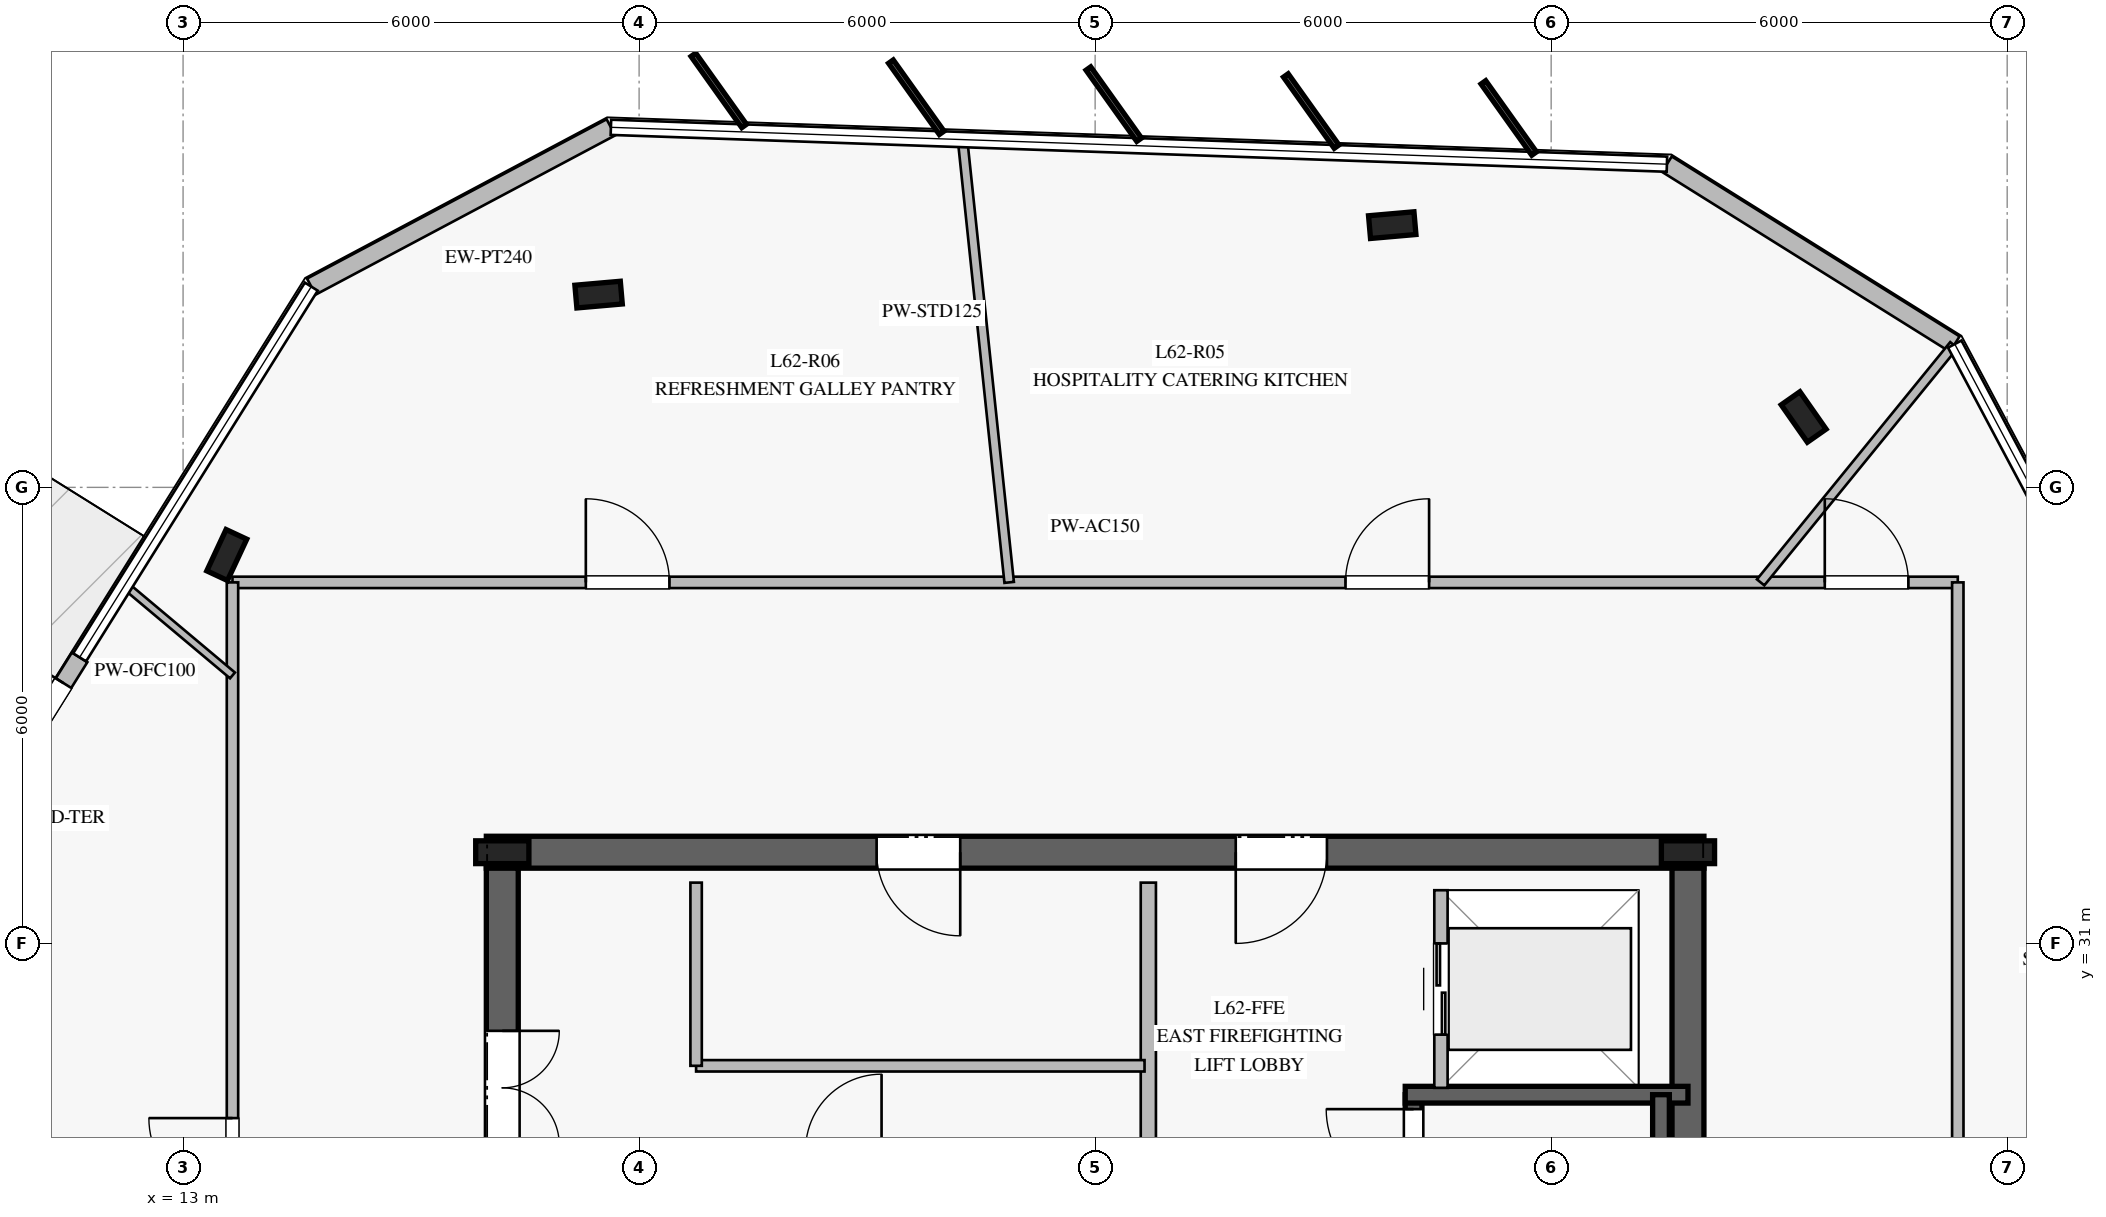
"""IFC4 building model, lengths in metres.
Left out: names, types, materials, properties, quantities, classifications, styles, units other than length and angle.
Written with IfcOpenShell. Run it as: python <this file> out.ifc"""

import sys

from ifc_helpers import new_model, si_unit, direction, frame, frame_2d, origin, origin_2d, place, context, subcontext, project, spatial, rectangle, i_section, extrude, element, fill, save


model = new_model("IFC4")
c1 = context("Model", 3, precision=1e-05, world=origin(), true_north=direction((0.0, 1.0)))
c2 = subcontext(c1, "Body", "Model", "MODEL_VIEW")
j1 = project(units=[si_unit("LENGTHUNIT", "METRE"), si_unit("PLANEANGLEUNIT", "RADIAN")], contexts=[c1])
p1 = place(None, origin())
s1 = spatial("IfcSite", under=j1, at=p1, CompositionType="ELEMENT")
p2 = place(p1, origin())
s2 = spatial("IfcBuilding", under=s1, at=p2, CompositionType="ELEMENT")
p3 = place(p2, frame((0.0, 0.0, 258.2)))
s3 = spatial("IfcBuildingStorey", under=s2, at=p3, CompositionType="ELEMENT", Elevation=258.2)
p4 = place(p3, frame((33.01, 32.2, 0.0), z_axis=(0.0, 0.0, 1.0), x_axis=(-1.0, 0.0, 0.0)))
e1 = element("IfcWall", 1, at=p4, inside=s3, PredefinedType="SHEAR", context=c2, shape_type="SweptSolid", body=[
    extrude(rectangle(XDim=16.02, YDim=0.42, at=frame_2d((8.01, 0.0))), origin(), (0.0, 0.0, 1.0), 3.78),
])
p5 = place(p4, frame((4.96, 0.0, 0.0)))
e2 = element("IfcOpeningElement", 2, at=p5, cuts=e1, PredefinedType="OPENING", context=c2, shape_type="SweptSolid", body=[
    extrude(rectangle(XDim=1.2, YDim=2.25, at=frame_2d((0.6, 1.125))), frame((0.0, 0.22, 0.0), z_axis=(0.0, -1.0, 0.0), x_axis=(1.0, 0.0, 0.0)), (0.0, 0.0, 1.0), 0.44),
])
p6 = place(p4, frame((9.785, 0.0, 0.0)))
e3 = element("IfcOpeningElement", 3, at=p6, cuts=e1, PredefinedType="OPENING", context=c2, shape_type="SweptSolid", body=[
    extrude(rectangle(XDim=1.1, YDim=2.2, at=frame_2d((0.55, 1.1))), frame((0.0, 0.22, 0.0), z_axis=(0.0, -1.0, 0.0), x_axis=(1.0, 0.0, 0.0)), (0.0, 0.0, 1.0), 0.44),
])
p7 = place(p3, frame((17.2, 31.99, 0.0), z_axis=(0.0, 0.0, 1.0), x_axis=(0.0, -1.0, 0.0)))
e4 = element("IfcWall", 4, at=p7, inside=s3, PredefinedType="SHEAR", context=c2, shape_type="SweptSolid", body=[
    extrude(rectangle(XDim=13.98, YDim=0.42, at=frame_2d((6.99, 0.0))), origin(), (0.0, 0.0, 1.0), 3.78),
])
p8 = place(p7, frame((2.14, 0.0, 0.0)))
e5 = element("IfcOpeningElement", 5, at=p8, cuts=e4, PredefinedType="OPENING", context=c2, shape_type="SweptSolid", body=[
    extrude(rectangle(XDim=1.5, YDim=2.2, at=frame_2d((0.75, 1.1))), frame((0.0, 0.22, 0.0), z_axis=(0.0, -1.0, 0.0), x_axis=(1.0, 0.0, 0.0)), (0.0, 0.0, 1.0), 0.44),
])
p9 = place(p3, frame((32.8, 18.01, 0.0), z_axis=(0.0, 0.0, 1.0), x_axis=(0.0, 1.0, 0.0)))
e6 = element("IfcWall", 6, at=p9, inside=s3, PredefinedType="SHEAR", context=c2, shape_type="SweptSolid", body=[
    extrude(rectangle(XDim=13.98, YDim=0.42, at=frame_2d((6.99, 0.0))), origin(), (0.0, 0.0, 1.0), 3.78),
])
for number, where, z_axis, x_axis in (
    (7, (32.8, 32.2, 0.0), (0.0, 0.0, 1.0), (1.0, 0.0, 0.0)),
    (8, (17.2, 32.2, 0.0), (0.0, 0.0, 1.0), (1.0, 0.0, 0.0)),
):
    element("IfcColumn", number, at=place(p3, frame(where, z_axis=z_axis, x_axis=x_axis)), inside=s3, PredefinedType="COLUMN", context=c2, shape_type="SweptSolid", body=[
        extrude(i_section(OverallWidth=0.3, OverallDepth=0.7, WebThickness=0.017, FlangeThickness=0.032, at=origin_2d()), origin(), (0.0, 0.0, 1.0), 4.0),
    ])
p10 = place(p3, frame((29.19, 21.79, 0.0), z_axis=(0.0, 0.0, 1.0), x_axis=(0.0, 1.0, 0.0)))
e9 = element("IfcWall", 9, at=p10, inside=s3, PredefinedType="SOLIDWALL", context=c2, shape_type="SweptSolid", body=[
    extrude(rectangle(XDim=7.22, YDim=0.22, at=frame_2d((3.61, 0.0))), origin(), (0.0, 0.0, 1.0), 3.78),
])
p11 = place(p10, frame((5.88, 0.0, 0.0)))
e10 = element("IfcOpeningElement", 10, at=p11, cuts=e9, PredefinedType="OPENING", context=c2, shape_type="SweptSolid", body=[
    extrude(rectangle(XDim=1.15, YDim=2.2, at=frame_2d((0.575, 1.1))), frame((0.0, 0.12, 0.0), z_axis=(0.0, -1.0, 0.0), x_axis=(1.0, 0.0, 0.0)), (0.0, 0.0, 1.0), 0.24),
])
p12 = place(p3, frame((29.08, 29.01, 0.0), z_axis=(0.0, 0.0, 1.0), x_axis=(1.0, 0.0, 0.0)))
e11 = element("IfcWall", 11, at=p12, inside=s3, PredefinedType="SOLIDWALL", context=c2, shape_type="SweptSolid", body=[
    extrude(rectangle(XDim=3.72, YDim=0.22, at=frame_2d((1.86, 0.0))), origin(), (0.0, 0.0, 1.0), 3.78),
])
p13 = place(p3, frame((32.445, 29.01, 0.0), z_axis=(0.0, 0.0, 1.0), x_axis=(0.0, -1.0, 0.0)))
e12 = element("IfcWall", 12, at=p13, inside=s3, PredefinedType="SOLIDWALL", context=c2, shape_type="SweptSolid", body=[
    extrude(rectangle(XDim=7.22, YDim=0.22, at=frame_2d((3.61, 0.0))), origin(), (0.0, 0.0, 1.0), 3.78),
])
for number, where, z_axis, x_axis in (
    (13, (28.909, 40.45, 0.0), (0.0, 0.0, 1.0), (0.996, 0.087, 0.0)),
    (14, (18.467, 39.536, 0.0), (0.0, 0.0, 1.0), (0.996, 0.087, 0.0)),
    (15, (13.575, 36.11, 0.0), (0.0, 0.0, 1.0), (0.423, 0.906, 0.0)),
    (16, (34.322, 37.926, 0.0), (0.0, 0.0, 1.0), (-0.574, 0.819, 0.0)),
):
    element("IfcColumn", number, at=place(p3, frame(where, z_axis=z_axis, x_axis=x_axis)), inside=s3, PredefinedType="COLUMN", context=c2, shape_type="SweptSolid", body=[
        extrude(i_section(OverallWidth=0.3, OverallDepth=0.6, WebThickness=0.015, FlangeThickness=0.03, at=origin_2d()), origin(), (0.0, 0.0, 1.0), 4.0),
    ])
p14 = place(p3, frame((18.629, 41.737, 0.0), z_axis=(0.0, 0.0, 1.0), x_axis=(-0.88294715046, -0.469472394816, 0.0)))
e17 = element("IfcWall", 17, at=p14, inside=s3, PredefinedType="STANDARD", context=c2, shape_type="SweptSolid", body=[
    extrude(rectangle(XDim=4.464, YDim=0.24, at=frame_2d((2.232, 0.0))), origin(), (0.0, 0.0, 1.0), 3.78),
])
p15 = place(p3, frame((11.639, 34.764, 0.0), z_axis=(0.0, 0.0, 1.0), x_axis=(-0.529751954381, -0.84815262001, 0.0)))
e18 = element("IfcWall", 18, at=p15, inside=s3, PredefinedType="STANDARD", context=c2, shape_type="SweptSolid", body=[
    extrude(rectangle(XDim=2.399, YDim=0.24, at=frame_2d((1.2, 0.0))), origin(), (0.0, 0.0, 1.0), 3.78),
])
p16 = place(p15, frame((0.4, 0.0, 0.0)))
e19 = element("IfcOpeningElement", 19, at=p16, cuts=e18, PredefinedType="OPENING", context=c2, shape_type="SweptSolid", body=[
    extrude(rectangle(XDim=1.6, YDim=2.25, at=frame_2d((0.8, 1.125))), frame((0.0, 0.13, 0.0), z_axis=(0.0, -1.0, 0.0), x_axis=(1.0, 0.0, 0.0)), (0.0, 0.0, 1.0), 0.26),
])
p17 = place(p3, frame((36.31, 38.885, 0.0), z_axis=(0.0, 0.0, 1.0), x_axis=(-0.847998304005, 0.529998940003, 0.0)))
e20 = element("IfcWall", 20, at=p17, inside=s3, PredefinedType="STANDARD", context=c2, shape_type="SweptSolid", body=[
    extrude(rectangle(XDim=4.466, YDim=0.24, at=frame_2d((2.233, 0.0))), origin(), (0.0, 0.0, 1.0), 3.78),
])
p18 = place(p3, frame((25.7, 26.65, 0.0), z_axis=(0.0, 0.0, 1.0), x_axis=(0.0, 1.0, 0.0)))
e21 = element("IfcWall", 21, at=p18, inside=s3, PredefinedType="PARTITIONING", context=c2, shape_type="SweptSolid", body=[
    extrude(rectangle(XDim=5.15, YDim=0.2, at=frame_2d((2.575, 0.0))), origin(), (0.0, 0.0, 1.0), 3.78),
])
p19 = place(p3, frame((19.75, 29.39, 0.0), z_axis=(0.0, 0.0, 1.0), x_axis=(1.0, 0.0, 0.0)))
e22 = element("IfcWall", 22, at=p19, inside=s3, PredefinedType="PARTITIONING", context=c2, shape_type="SweptSolid", body=[
    extrude(rectangle(XDim=5.9, YDim=0.15, at=frame_2d((2.95, 0.0))), origin(), (0.0, 0.0, 1.0), 3.78),
])
p20 = place(p3, frame((19.75, 29.39, 0.0), z_axis=(0.0, 0.0, 1.0), x_axis=(0.0, 1.0, 0.0)))
e23 = element("IfcWall", 23, at=p20, inside=s3, PredefinedType="PARTITIONING", context=c2, shape_type="SweptSolid", body=[
    extrude(rectangle(XDim=2.41, YDim=0.15, at=frame_2d((1.205, 0.0))), origin(), (0.0, 0.0, 1.0), 3.78),
])
p21 = place(p3, frame((29.55, 29.1, 0.0), z_axis=(0.0, 0.0, 1.0), x_axis=(0.0, 1.0, 0.0)))
e24 = element("IfcWall", 24, at=p21, inside=s3, PredefinedType="PARTITIONING", context=c2, shape_type="SweptSolid", body=[
    extrude(rectangle(XDim=2.6, YDim=0.175, at=frame_2d((1.3, 0.0))), origin(), (0.0, 0.0, 1.0), 3.78),
])
p22 = place(p21, frame((0.7, 0.0, 0.0)))
e25 = element("IfcOpeningElement", 25, at=p22, cuts=e24, PredefinedType="OPENING", context=c2, shape_type="SweptSolid", body=[
    extrude(rectangle(XDim=1.2, YDim=2.2, at=frame_2d((0.6, 1.1))), frame((0.0, 0.098, 0.0), z_axis=(0.0, -1.0, 0.0), x_axis=(1.0, 0.0, 0.0)), (0.0, 0.0, 1.0), 0.195),
])
p23 = place(p3, frame((13.65, 35.75, 0.0), z_axis=(0.0, 0.0, 1.0), x_axis=(1.0, 0.0, 0.0)))
e26 = element("IfcWall", 26, at=p23, inside=s3, PredefinedType="PARTITIONING", context=c2, shape_type="SweptSolid", body=[
    extrude(rectangle(XDim=22.7, YDim=0.15, at=frame_2d((11.35, 0.0))), origin(), (0.0, 0.0, 1.0), 3.28),
])
p24 = place(p23, frame((20.95, 0.0, 0.0)))
e27 = element("IfcOpeningElement", 27, at=p24, cuts=e26, PredefinedType="OPENING", context=c2, shape_type="SweptSolid", body=[
    extrude(rectangle(XDim=1.1, YDim=2.2, at=frame_2d((0.55, 1.1))), frame((0.0, 0.085, 0.0), z_axis=(0.0, -1.0, 0.0), x_axis=(1.0, 0.0, 0.0)), (0.0, 0.0, 1.0), 0.17),
])
p25 = place(p23, frame((14.644, 0.0, 0.0)))
e28 = element("IfcOpeningElement", 28, at=p25, cuts=e26, PredefinedType="OPENING", context=c2, shape_type="SweptSolid", body=[
    extrude(rectangle(XDim=1.1, YDim=2.2, at=frame_2d((0.55, 1.1))), frame((0.0, 0.085, 0.0), z_axis=(0.0, -1.0, 0.0), x_axis=(1.0, 0.0, 0.0)), (0.0, 0.0, 1.0), 0.17),
])
p26 = place(p23, frame((4.649, 0.0, 0.0)))
e29 = element("IfcOpeningElement", 29, at=p26, cuts=e26, PredefinedType="OPENING", context=c2, shape_type="SweptSolid", body=[
    extrude(rectangle(XDim=1.1, YDim=2.2, at=frame_2d((0.55, 1.1))), frame((0.0, 0.085, 0.0), z_axis=(0.0, -1.0, 0.0), x_axis=(1.0, 0.0, 0.0)), (0.0, 0.0, 1.0), 0.17),
])
p27 = place(p3, frame((36.35, 35.75, 0.0), z_axis=(0.0, 0.0, 1.0), x_axis=(0.0, -1.0, 0.0)))
e30 = element("IfcWall", 30, at=p27, inside=s3, PredefinedType="PARTITIONING", context=c2, shape_type="SweptSolid", body=[
    extrude(rectangle(XDim=21.5, YDim=0.15, at=frame_2d((10.75, 0.0))), origin(), (0.0, 0.0, 1.0), 3.25),
])
p28 = place(p27, frame((14.876, 0.0, 0.0)))
e31 = element("IfcOpeningElement", 31, at=p28, cuts=e30, PredefinedType="OPENING", context=c2, shape_type="SweptSolid", body=[
    extrude(rectangle(XDim=1.1, YDim=2.2, at=frame_2d((0.55, 1.1))), frame((0.0, 0.085, 0.0), z_axis=(0.0, -1.0, 0.0), x_axis=(1.0, 0.0, 0.0)), (0.0, 0.0, 1.0), 0.17),
])
p29 = place(p3, frame((13.65, 14.25, 0.0), z_axis=(0.0, 0.0, 1.0), x_axis=(0.0, 1.0, 0.0)))
e32 = element("IfcWall", 32, at=p29, inside=s3, PredefinedType="PARTITIONING", context=c2, shape_type="SweptSolid", body=[
    extrude(rectangle(XDim=21.5, YDim=0.15, at=frame_2d((10.75, 0.0))), origin(), (0.0, 0.0, 1.0), 3.25),
])
p30 = place(p29, frame((13.352, 0.0, 0.0)))
e33 = element("IfcOpeningElement", 33, at=p30, cuts=e32, PredefinedType="OPENING", context=c2, shape_type="SweptSolid", body=[
    extrude(rectangle(XDim=1.1, YDim=2.2, at=frame_2d((0.55, 1.1))), frame((0.0, 0.085, 0.0), z_axis=(0.0, -1.0, 0.0), x_axis=(1.0, 0.0, 0.0)), (0.0, 0.0, 1.0), 0.17),
])
p31 = place(p3, frame((23.869, 35.75, 0.0), z_axis=(0.0, 0.0, 1.0), x_axis=(-0.104723940422, 0.994501330468, 0.0)))
e34 = element("IfcWall", 34, at=p31, inside=s3, PredefinedType="PARTITIONING", context=c2, shape_type="SweptSolid", body=[
    extrude(rectangle(XDim=5.842, YDim=0.125, at=frame_2d((2.921, 0.0))), origin(), (0.0, 0.0, 1.0), 3.28),
])
p32 = place(p3, frame((13.65, 34.526, 0.0), z_axis=(0.0, 0.0, 1.0), x_axis=(-0.76596722559, 0.64287962273, 0.0)))
e35 = element("IfcWall", 35, at=p32, inside=s3, PredefinedType="MOVABLE", context=c2, shape_type="SweptSolid", body=[
    extrude(rectangle(XDim=1.833, YDim=0.1, at=frame_2d((0.917, 0.0))), origin(), (0.0, 0.0, 1.0), 3.28),
])
p33 = place(p3, frame((33.756, 35.75, 0.0), z_axis=(0.0, 0.0, 1.0), x_axis=(0.631532584773, 0.775349336989, 0.0)))
e36 = element("IfcWall", 36, at=p33, inside=s3, PredefinedType="PARTITIONING", context=c2, shape_type="SweptSolid", body=[
    extrude(rectangle(XDim=4.027, YDim=0.125, at=frame_2d((2.013, 0.0))), origin(), (0.0, 0.0, 1.0), 3.28),
])
p34 = place(p16, frame((1.6, 0.0, 0.0), z_axis=(0.0, 0.0, 1.0), x_axis=(-1.0, 0.0, 0.0)))
e37 = element("IfcDoor", 37, at=p34, inside=s3, OperationType="DOUBLE_DOOR_SINGLE_SWING", PredefinedType="DOOR", context=c2, shape_type="SweptSolid", body=[
    extrude(rectangle(XDim=1.6, YDim=2.25, at=frame_2d((0.8, 1.125))), frame((0.0, 0.025, 0.0), z_axis=(0.0, -1.0, 0.0), x_axis=(1.0, 0.0, 0.0)), (0.0, 0.0, 1.0), 0.05),
])
fill(e19, e37)
p35 = place(p11, origin())
e38 = element("IfcDoor", 38, at=p35, inside=s3, OperationType="SINGLE_SWING_RIGHT", PredefinedType="DOOR", context=c2, shape_type="SweptSolid", body=[
    extrude(rectangle(XDim=1.15, YDim=2.2, at=frame_2d((0.575, 1.1))), frame((0.0, 0.025, 0.0), z_axis=(0.0, -1.0, 0.0), x_axis=(1.0, 0.0, 0.0)), (0.0, 0.0, 1.0), 0.05),
])
fill(e10, e38)
p36 = place(p5, origin())
e39 = element("IfcDoor", 39, at=p36, inside=s3, OperationType="SINGLE_SWING_RIGHT", PredefinedType="DOOR", context=c2, shape_type="SweptSolid", body=[
    extrude(rectangle(XDim=1.2, YDim=2.25, at=frame_2d((0.6, 1.125))), frame((0.0, 0.025, 0.0), z_axis=(0.0, -1.0, 0.0), x_axis=(1.0, 0.0, 0.0)), (0.0, 0.0, 1.0), 0.05),
])
fill(e2, e39)
p37 = place(p8, origin())
e40 = element("IfcDoor", 40, at=p37, inside=s3, OperationType="DOUBLE_DOOR_SINGLE_SWING", PredefinedType="DOOR", context=c2, shape_type="SweptSolid", body=[
    extrude(rectangle(XDim=1.5, YDim=2.2, at=frame_2d((0.75, 1.1))), frame((0.0, 0.025, 0.0), z_axis=(0.0, -1.0, 0.0), x_axis=(1.0, 0.0, 0.0)), (0.0, 0.0, 1.0), 0.05),
])
fill(e5, e40)
p38 = place(p6, origin())
e41 = element("IfcDoor", 41, at=p38, inside=s3, OperationType="SINGLE_SWING_LEFT", PredefinedType="DOOR", context=c2, shape_type="SweptSolid", body=[
    extrude(rectangle(XDim=1.1, YDim=2.2, at=frame_2d((0.55, 1.1))), frame((0.0, 0.025, 0.0), z_axis=(0.0, -1.0, 0.0), x_axis=(1.0, 0.0, 0.0)), (0.0, 0.0, 1.0), 0.05),
])
fill(e3, e41)
p39 = place(p22, origin())
e42 = element("IfcDoor", 42, at=p39, inside=s3, OperationType="DOUBLE_DOOR_SLIDING", PredefinedType="DOOR", context=c2, shape_type="SweptSolid", body=[
    extrude(rectangle(XDim=1.2, YDim=2.2, at=frame_2d((0.6, 1.1))), frame((0.0, 0.025, 0.0), z_axis=(0.0, -1.0, 0.0), x_axis=(1.0, 0.0, 0.0)), (0.0, 0.0, 1.0), 0.05),
])
fill(e25, e42)
p40 = place(p24, origin())
e43 = element("IfcDoor", 43, at=p40, inside=s3, OperationType="SINGLE_SWING_LEFT", PredefinedType="DOOR", context=c2, shape_type="SweptSolid", body=[
    extrude(rectangle(XDim=1.1, YDim=2.2, at=frame_2d((0.55, 1.1))), frame((0.0, 0.025, 0.0), z_axis=(0.0, -1.0, 0.0), x_axis=(1.0, 0.0, 0.0)), (0.0, 0.0, 1.0), 0.05),
])
fill(e27, e43)
p41 = place(p25, origin())
e44 = element("IfcDoor", 44, at=p41, inside=s3, OperationType="SINGLE_SWING_RIGHT", PredefinedType="DOOR", context=c2, shape_type="SweptSolid", body=[
    extrude(rectangle(XDim=1.1, YDim=2.2, at=frame_2d((0.55, 1.1))), frame((0.0, 0.025, 0.0), z_axis=(0.0, -1.0, 0.0), x_axis=(1.0, 0.0, 0.0)), (0.0, 0.0, 1.0), 0.05),
])
fill(e28, e44)
p42 = place(p26, origin())
e45 = element("IfcDoor", 45, at=p42, inside=s3, OperationType="SINGLE_SWING_LEFT", PredefinedType="DOOR", context=c2, shape_type="SweptSolid", body=[
    extrude(rectangle(XDim=1.1, YDim=2.2, at=frame_2d((0.55, 1.1))), frame((0.0, 0.025, 0.0), z_axis=(0.0, -1.0, 0.0), x_axis=(1.0, 0.0, 0.0)), (0.0, 0.0, 1.0), 0.05),
])
fill(e29, e45)
p43 = place(p30, origin())
e46 = element("IfcDoor", 46, at=p43, inside=s3, OperationType="SINGLE_SWING_RIGHT", PredefinedType="DOOR", context=c2, shape_type="SweptSolid", body=[
    extrude(rectangle(XDim=1.1, YDim=2.2, at=frame_2d((0.55, 1.1))), frame((0.0, 0.025, 0.0), z_axis=(0.0, -1.0, 0.0), x_axis=(1.0, 0.0, 0.0)), (0.0, 0.0, 1.0), 0.05),
])
fill(e33, e46)
save(model, sys.argv[1])
